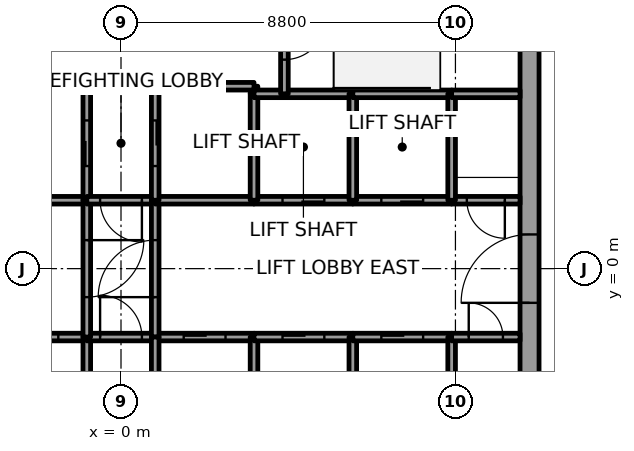
"""IFC4 building model, lengths in metres.
Left out: names, types, materials, properties, quantities, classifications, styles, units other than length and angle.
Written with IfcOpenShell. Run it as: python <this file> out.ifc"""

import sys

from ifc_helpers import new_model, si_unit, direction, frame, frame_2d, origin, place, context, subcontext, project, spatial, rectangle, extrude, element, fill, save


model = new_model("IFC4")
c1 = context("Model", 3, precision=1e-05, world=origin(), true_north=direction((0.0, 1.0)))
c2 = subcontext(c1, "Body", "Model", "MODEL_VIEW")
j1 = project(units=[si_unit("LENGTHUNIT", "METRE"), si_unit("PLANEANGLEUNIT", "RADIAN")], contexts=[c1])
p1 = place(None, origin())
s1 = spatial("IfcSite", under=j1, at=p1, CompositionType="ELEMENT")
p2 = place(p1, origin())
s2 = spatial("IfcBuilding", under=s1, at=p2, CompositionType="ELEMENT")
p3 = place(p2, frame((0.0, 0.0, 118.6)))
s3 = spatial("IfcBuildingStorey", under=s2, at=p3, CompositionType="ELEMENT", Elevation=118.6)
p4 = place(p3, frame((10.75, -7.5, 0.0), z_axis=(0.0, 0.0, 1.0), x_axis=(0.0, 1.0, 0.0)))
e1 = element("IfcWall", 1, at=p4, inside=s3, PredefinedType="SHEAR", context=c2, shape_type="SweptSolid", body=[
    extrude(rectangle(XDim=15.0, YDim=0.5, at=frame_2d((7.5, 0.0))), origin(), (0.0, 0.0, 1.0), 7.2),
])
p5 = place(p4, frame((6.6, 0.0, 0.0)))
e2 = element("IfcOpeningElement", 2, at=p5, cuts=e1, PredefinedType="OPENING", context=c2, shape_type="SweptSolid", body=[
    extrude(rectangle(XDim=1.8, YDim=2.1, at=frame_2d((0.9, 1.05))), frame((0.0, 0.25, 0.0), z_axis=(0.0, -1.0, 0.0), x_axis=(1.0, 0.0, 0.0)), (0.0, 0.0, 1.0), 0.5),
])
p6 = place(p3, frame((-3.5, -1.8, 0.0), z_axis=(0.0, 0.0, 1.0), x_axis=(1.0, 0.0, 0.0)))
e3 = element("IfcWall", 3, at=p6, inside=s3, PredefinedType="SOLIDWALL", context=c2, shape_type="SweptSolid", body=[
    extrude(rectangle(XDim=2.6, YDim=0.2, at=frame_2d((1.3, 0.0))), origin(), (0.0, 0.0, 1.0), 7.05),
])
p7 = place(p6, frame((0.75, 0.0, 0.0)))
e4 = element("IfcOpeningElement", 4, at=p7, cuts=e3, PredefinedType="OPENING", context=c2, shape_type="SweptSolid", body=[
    extrude(rectangle(XDim=1.1, YDim=2.1, at=frame_2d((0.55, 1.05))), frame((0.0, 0.1, 0.0), z_axis=(0.0, -1.0, 0.0), x_axis=(1.0, 0.0, 0.0)), (0.0, 0.0, 1.0), 0.2),
])
p8 = place(p3, frame((-0.9, 1.8, 0.0), z_axis=(0.0, 0.0, 1.0), x_axis=(-1.0, 0.0, 0.0)))
e5 = element("IfcWall", 5, at=p8, inside=s3, PredefinedType="SOLIDWALL", context=c2, shape_type="SweptSolid", body=[
    extrude(rectangle(XDim=2.6, YDim=0.2, at=frame_2d((1.3, 0.0))), origin(), (0.0, 0.0, 1.0), 7.05),
])
p9 = place(p3, frame((-0.9, 1.8, 0.0), z_axis=(0.0, 0.0, 1.0), x_axis=(0.0, 1.0, 0.0)))
e6 = element("IfcWall", 6, at=p9, inside=s3, PredefinedType="SOLIDWALL", context=c2, shape_type="SweptSolid", body=[
    extrude(rectangle(XDim=3.0, YDim=0.2, at=frame_2d((1.5, 0.0))), origin(), (0.0, 0.0, 1.0), 7.05),
])
p10 = place(p9, frame((0.9, 0.0, 0.0)))
e7 = element("IfcOpeningElement", 7, at=p10, cuts=e6, PredefinedType="OPENING", context=c2, shape_type="SweptSolid", body=[
    extrude(rectangle(XDim=1.2, YDim=2.1, at=frame_2d((0.6, 1.05))), frame((0.0, 0.1, 0.0), z_axis=(0.0, -1.0, 0.0), x_axis=(1.0, 0.0, 0.0)), (0.0, 0.0, 1.0), 0.2),
])
p11 = place(p3, frame((-0.9, 4.8, 0.0), z_axis=(0.0, 0.0, 1.0), x_axis=(-1.0, 0.0, 0.0)))
e8 = element("IfcWall", 8, at=p11, inside=s3, PredefinedType="SOLIDWALL", context=c2, shape_type="SweptSolid", body=[
    extrude(rectangle(XDim=2.6, YDim=0.2, at=frame_2d((1.3, 0.0))), origin(), (0.0, 0.0, 1.0), 7.05),
])
p12 = place(p3, frame((-0.9, -4.6, 0.0), z_axis=(0.0, 0.0, 1.0), x_axis=(0.0, 1.0, 0.0)))
e9 = element("IfcWall", 9, at=p12, inside=s3, PredefinedType="SOLIDWALL", context=c2, shape_type="SweptSolid", body=[
    extrude(rectangle(XDim=2.8, YDim=0.2, at=frame_2d((1.4, 0.0))), origin(), (0.0, 0.0, 1.0), 7.05),
])
p13 = place(p3, frame((-0.9, -1.8, 0.0), z_axis=(0.0, 0.0, 1.0), x_axis=(1.0, 0.0, 0.0)))
e10 = element("IfcWall", 10, at=p13, inside=s3, PredefinedType="SOLIDWALL", context=c2, shape_type="SweptSolid", body=[
    extrude(rectangle(XDim=1.8, YDim=0.2, at=frame_2d((0.9, 0.0))), origin(), (0.0, 0.0, 1.0), 7.05),
])
p14 = place(p13, frame((0.35, 0.0, 0.0)))
e11 = element("IfcOpeningElement", 11, at=p14, cuts=e10, PredefinedType="OPENING", context=c2, shape_type="SweptSolid", body=[
    extrude(rectangle(XDim=1.1, YDim=2.1, at=frame_2d((0.55, 1.05))), frame((0.0, 0.1, 0.0), z_axis=(0.0, -1.0, 0.0), x_axis=(1.0, 0.0, 0.0)), (0.0, 0.0, 1.0), 0.2),
])
p15 = place(p3, frame((-0.9, 1.8, 0.0), z_axis=(0.0, 0.0, 1.0), x_axis=(0.0, -1.0, 0.0)))
e12 = element("IfcWall", 12, at=p15, inside=s3, PredefinedType="SOLIDWALL", context=c2, shape_type="SweptSolid", body=[
    extrude(rectangle(XDim=3.6, YDim=0.2, at=frame_2d((1.8, 0.0))), origin(), (0.0, 0.0, 1.0), 7.05),
])
p16 = place(p15, frame((1.05, 0.0, 0.0)))
e13 = element("IfcOpeningElement", 13, at=p16, cuts=e12, PredefinedType="OPENING", context=c2, shape_type="SweptSolid", body=[
    extrude(rectangle(XDim=1.5, YDim=2.1, at=frame_2d((0.75, 1.05))), frame((0.0, 0.1, 0.0), z_axis=(0.0, -1.0, 0.0), x_axis=(1.0, 0.0, 0.0)), (0.0, 0.0, 1.0), 0.2),
])
p17 = place(p3, frame((0.9, 1.8, 0.0), z_axis=(0.0, 0.0, 1.0), x_axis=(-1.0, 0.0, 0.0)))
e14 = element("IfcWall", 14, at=p17, inside=s3, PredefinedType="SOLIDWALL", context=c2, shape_type="SweptSolid", body=[
    extrude(rectangle(XDim=1.8, YDim=0.2, at=frame_2d((0.9, 0.0))), origin(), (0.0, 0.0, 1.0), 7.05),
])
p18 = place(p17, frame((0.35, 0.0, 0.0)))
e15 = element("IfcOpeningElement", 15, at=p18, cuts=e14, PredefinedType="OPENING", context=c2, shape_type="SweptSolid", body=[
    extrude(rectangle(XDim=1.1, YDim=2.1, at=frame_2d((0.55, 1.05))), frame((0.0, 0.1, 0.0), z_axis=(0.0, -1.0, 0.0), x_axis=(1.0, 0.0, 0.0)), (0.0, 0.0, 1.0), 0.2),
])
p19 = place(p3, frame((0.9, -1.8, 0.0), z_axis=(0.0, 0.0, 1.0), x_axis=(1.0, 0.0, 0.0)))
e16 = element("IfcWall", 16, at=p19, inside=s3, PredefinedType="SOLIDWALL", context=c2, shape_type="SweptSolid", body=[
    extrude(rectangle(XDim=2.6, YDim=0.2, at=frame_2d((1.3, 0.0))), origin(), (0.0, 0.0, 1.0), 7.05),
])
p20 = place(p19, frame((0.75, 0.0, 0.0)))
e17 = element("IfcOpeningElement", 17, at=p20, cuts=e16, PredefinedType="OPENING", context=c2, shape_type="SweptSolid", body=[
    extrude(rectangle(XDim=1.1, YDim=2.1, at=frame_2d((0.55, 1.05))), frame((0.0, 0.1, 0.0), z_axis=(0.0, -1.0, 0.0), x_axis=(1.0, 0.0, 0.0)), (0.0, 0.0, 1.0), 0.2),
])
p21 = place(p3, frame((0.9, -1.8, 0.0), z_axis=(0.0, 0.0, 1.0), x_axis=(0.0, 1.0, 0.0)))
e18 = element("IfcWall", 18, at=p21, inside=s3, PredefinedType="SOLIDWALL", context=c2, shape_type="SweptSolid", body=[
    extrude(rectangle(XDim=3.6, YDim=0.2, at=frame_2d((1.8, 0.0))), origin(), (0.0, 0.0, 1.0), 7.05),
])
p22 = place(p21, frame((1.05, 0.0, 0.0)))
e19 = element("IfcOpeningElement", 19, at=p22, cuts=e18, PredefinedType="OPENING", context=c2, shape_type="SweptSolid", body=[
    extrude(rectangle(XDim=1.5, YDim=2.1, at=frame_2d((0.75, 1.05))), frame((0.0, 0.1, 0.0), z_axis=(0.0, -1.0, 0.0), x_axis=(1.0, 0.0, 0.0)), (0.0, 0.0, 1.0), 0.2),
])
p23 = place(p3, frame((0.9, -1.8, 0.0), z_axis=(0.0, 0.0, 1.0), x_axis=(0.0, -1.0, 0.0)))
e20 = element("IfcWall", 20, at=p23, inside=s3, PredefinedType="SOLIDWALL", context=c2, shape_type="SweptSolid", body=[
    extrude(rectangle(XDim=2.8, YDim=0.2, at=frame_2d((1.4, 0.0))), origin(), (0.0, 0.0, 1.0), 7.05),
])
p24 = place(p3, frame((3.5, 1.8, 0.0), z_axis=(0.0, 0.0, 1.0), x_axis=(-1.0, 0.0, 0.0)))
e21 = element("IfcWall", 21, at=p24, inside=s3, PredefinedType="SOLIDWALL", context=c2, shape_type="SweptSolid", body=[
    extrude(rectangle(XDim=2.6, YDim=0.2, at=frame_2d((1.3, 0.0))), origin(), (0.0, 0.0, 1.0), 7.05),
])
p25 = place(p3, frame((3.5, 4.6, 0.0), z_axis=(0.0, 0.0, 1.0), x_axis=(0.0, 1.0, 0.0)))
e22 = element("IfcWall", 22, at=p25, inside=s3, PredefinedType="SOLIDWALL", context=c2, shape_type="SweptSolid", body=[
    extrude(rectangle(XDim=0.2, YDim=0.2, at=frame_2d((0.1, 0.0))), origin(), (0.0, 0.0, 1.0), 7.05),
])
p26 = place(p3, frame((3.5, 4.8, 0.0), z_axis=(0.0, 0.0, 1.0), x_axis=(-1.0, 0.0, 0.0)))
e23 = element("IfcWall", 23, at=p26, inside=s3, PredefinedType="SOLIDWALL", context=c2, shape_type="SweptSolid", body=[
    extrude(rectangle(XDim=2.6, YDim=0.2, at=frame_2d((1.3, 0.0))), origin(), (0.0, 0.0, 1.0), 7.05),
])
p27 = place(p3, frame((0.9, 4.8, 0.0), z_axis=(0.0, 0.0, 1.0), x_axis=(0.0, -1.0, 0.0)))
e24 = element("IfcWall", 24, at=p27, inside=s3, PredefinedType="SOLIDWALL", context=c2, shape_type="SweptSolid", body=[
    extrude(rectangle(XDim=3.0, YDim=0.2, at=frame_2d((1.5, 0.0))), origin(), (0.0, 0.0, 1.0), 7.05),
])
p28 = place(p27, frame((0.9, 0.0, 0.0)))
e25 = element("IfcOpeningElement", 25, at=p28, cuts=e24, PredefinedType="OPENING", context=c2, shape_type="SweptSolid", body=[
    extrude(rectangle(XDim=1.2, YDim=2.1, at=frame_2d((0.6, 1.05))), frame((0.0, 0.1, 0.0), z_axis=(0.0, -1.0, 0.0), x_axis=(1.0, 0.0, 0.0)), (0.0, 0.0, 1.0), 0.2),
])
p29 = place(p3, frame((3.5, -4.6, 0.0), z_axis=(0.0, 0.0, 1.0), x_axis=(0.0, 1.0, 0.0)))
e26 = element("IfcWall", 26, at=p29, inside=s3, PredefinedType="SOLIDWALL", context=c2, shape_type="SweptSolid", body=[
    extrude(rectangle(XDim=2.8, YDim=0.2, at=frame_2d((1.4, 0.0))), origin(), (0.0, 0.0, 1.0), 7.05),
])
p30 = place(p3, frame((3.5, -1.8, 0.0), z_axis=(0.0, 0.0, 1.0), x_axis=(1.0, 0.0, 0.0)))
e27 = element("IfcWall", 27, at=p30, inside=s3, PredefinedType="SOLIDWALL", context=c2, shape_type="SweptSolid", body=[
    extrude(rectangle(XDim=2.6, YDim=0.2, at=frame_2d((1.3, 0.0))), origin(), (0.0, 0.0, 1.0), 7.05),
])
p31 = place(p30, frame((0.75, 0.0, 0.0)))
e28 = element("IfcOpeningElement", 28, at=p31, cuts=e27, PredefinedType="OPENING", context=c2, shape_type="SweptSolid", body=[
    extrude(rectangle(XDim=1.1, YDim=2.1, at=frame_2d((0.55, 1.05))), frame((0.0, 0.1, 0.0), z_axis=(0.0, -1.0, 0.0), x_axis=(1.0, 0.0, 0.0)), (0.0, 0.0, 1.0), 0.2),
])
p32 = place(p3, frame((6.1, 1.8, 0.0), z_axis=(0.0, 0.0, 1.0), x_axis=(-1.0, 0.0, 0.0)))
e29 = element("IfcWall", 29, at=p32, inside=s3, PredefinedType="SOLIDWALL", context=c2, shape_type="SweptSolid", body=[
    extrude(rectangle(XDim=2.6, YDim=0.2, at=frame_2d((1.3, 0.0))), origin(), (0.0, 0.0, 1.0), 7.05),
])
p33 = place(p32, frame((0.75, 0.0, 0.0)))
e30 = element("IfcOpeningElement", 30, at=p33, cuts=e29, PredefinedType="OPENING", context=c2, shape_type="SweptSolid", body=[
    extrude(rectangle(XDim=1.1, YDim=2.1, at=frame_2d((0.55, 1.05))), frame((0.0, 0.1, 0.0), z_axis=(0.0, -1.0, 0.0), x_axis=(1.0, 0.0, 0.0)), (0.0, 0.0, 1.0), 0.2),
])
p34 = place(p3, frame((3.5, 1.8, 0.0), z_axis=(0.0, 0.0, 1.0), x_axis=(0.0, 1.0, 0.0)))
e31 = element("IfcWall", 31, at=p34, inside=s3, PredefinedType="SOLIDWALL", context=c2, shape_type="SweptSolid", body=[
    extrude(rectangle(XDim=2.8, YDim=0.2, at=frame_2d((1.4, 0.0))), origin(), (0.0, 0.0, 1.0), 7.05),
])
p35 = place(p3, frame((4.3, 4.6, 0.0), z_axis=(0.0, 0.0, 1.0), x_axis=(-1.0, 0.0, 0.0)))
e32 = element("IfcWall", 32, at=p35, inside=s3, PredefinedType="SOLIDWALL", context=c2, shape_type="SweptSolid", body=[
    extrude(rectangle(XDim=0.8, YDim=0.2, at=frame_2d((0.4, 0.0))), origin(), (0.0, 0.0, 1.0), 7.05),
])
p36 = place(p3, frame((6.1, 4.6, 0.0), z_axis=(0.0, 0.0, 1.0), x_axis=(-1.0, 0.0, 0.0)))
e33 = element("IfcWall", 33, at=p36, inside=s3, PredefinedType="SOLIDWALL", context=c2, shape_type="SweptSolid", body=[
    extrude(rectangle(XDim=1.8, YDim=0.2, at=frame_2d((0.9, 0.0))), origin(), (0.0, 0.0, 1.0), 7.05),
])
p37 = place(p3, frame((4.3, 7.5, 0.0), z_axis=(0.0, 0.0, 1.0), x_axis=(0.0, -1.0, 0.0)))
e34 = element("IfcWall", 34, at=p37, inside=s3, PredefinedType="SOLIDWALL", context=c2, shape_type="SweptSolid", body=[
    extrude(rectangle(XDim=2.9, YDim=0.2, at=frame_2d((1.45, 0.0))), origin(), (0.0, 0.0, 1.0), 7.05),
])
p38 = place(p37, frame((0.9, 0.0, 0.0)))
e35 = element("IfcOpeningElement", 35, at=p38, cuts=e34, PredefinedType="OPENING", context=c2, shape_type="SweptSolid", body=[
    extrude(rectangle(XDim=1.1, YDim=2.1, at=frame_2d((0.55, 1.05))), frame((0.0, 0.1, 0.0), z_axis=(0.0, -1.0, 0.0), x_axis=(1.0, 0.0, 0.0)), (0.0, 0.0, 1.0), 0.2),
])
p39 = place(p3, frame((6.1, -4.6, 0.0), z_axis=(0.0, 0.0, 1.0), x_axis=(0.0, 1.0, 0.0)))
e36 = element("IfcWall", 36, at=p39, inside=s3, PredefinedType="SOLIDWALL", context=c2, shape_type="SweptSolid", body=[
    extrude(rectangle(XDim=2.8, YDim=0.2, at=frame_2d((1.4, 0.0))), origin(), (0.0, 0.0, 1.0), 7.05),
])
p40 = place(p3, frame((6.1, -1.8, 0.0), z_axis=(0.0, 0.0, 1.0), x_axis=(1.0, 0.0, 0.0)))
e37 = element("IfcWall", 37, at=p40, inside=s3, PredefinedType="SOLIDWALL", context=c2, shape_type="SweptSolid", body=[
    extrude(rectangle(XDim=2.6, YDim=0.2, at=frame_2d((1.3, 0.0))), origin(), (0.0, 0.0, 1.0), 7.05),
])
p41 = place(p40, frame((0.75, 0.0, 0.0)))
e38 = element("IfcOpeningElement", 38, at=p41, cuts=e37, PredefinedType="OPENING", context=c2, shape_type="SweptSolid", body=[
    extrude(rectangle(XDim=1.1, YDim=2.1, at=frame_2d((0.55, 1.05))), frame((0.0, 0.1, 0.0), z_axis=(0.0, -1.0, 0.0), x_axis=(1.0, 0.0, 0.0)), (0.0, 0.0, 1.0), 0.2),
])
p42 = place(p3, frame((8.7, 1.8, 0.0), z_axis=(0.0, 0.0, 1.0), x_axis=(-1.0, 0.0, 0.0)))
e39 = element("IfcWall", 39, at=p42, inside=s3, PredefinedType="SOLIDWALL", context=c2, shape_type="SweptSolid", body=[
    extrude(rectangle(XDim=2.6, YDim=0.2, at=frame_2d((1.3, 0.0))), origin(), (0.0, 0.0, 1.0), 7.05),
])
p43 = place(p42, frame((0.75, 0.0, 0.0)))
e40 = element("IfcOpeningElement", 40, at=p43, cuts=e39, PredefinedType="OPENING", context=c2, shape_type="SweptSolid", body=[
    extrude(rectangle(XDim=1.1, YDim=2.1, at=frame_2d((0.55, 1.05))), frame((0.0, 0.1, 0.0), z_axis=(0.0, -1.0, 0.0), x_axis=(1.0, 0.0, 0.0)), (0.0, 0.0, 1.0), 0.2),
])
p44 = place(p3, frame((6.1, 1.8, 0.0), z_axis=(0.0, 0.0, 1.0), x_axis=(0.0, 1.0, 0.0)))
e41 = element("IfcWall", 41, at=p44, inside=s3, PredefinedType="SOLIDWALL", context=c2, shape_type="SweptSolid", body=[
    extrude(rectangle(XDim=2.8, YDim=0.2, at=frame_2d((1.4, 0.0))), origin(), (0.0, 0.0, 1.0), 7.05),
])
p45 = place(p3, frame((8.7, 4.6, 0.0), z_axis=(0.0, 0.0, 1.0), x_axis=(-1.0, 0.0, 0.0)))
e42 = element("IfcWall", 42, at=p45, inside=s3, PredefinedType="SOLIDWALL", context=c2, shape_type="SweptSolid", body=[
    extrude(rectangle(XDim=2.6, YDim=0.2, at=frame_2d((1.3, 0.0))), origin(), (0.0, 0.0, 1.0), 7.05),
])
p46 = place(p3, frame((8.7, -1.8, 0.0), z_axis=(0.0, 0.0, 1.0), x_axis=(0.0, -1.0, 0.0)))
e43 = element("IfcWall", 43, at=p46, inside=s3, PredefinedType="SOLIDWALL", context=c2, shape_type="SweptSolid", body=[
    extrude(rectangle(XDim=2.8, YDim=0.2, at=frame_2d((1.4, 0.0))), origin(), (0.0, 0.0, 1.0), 7.05),
])
p47 = place(p3, frame((8.7, -1.8, 0.0), z_axis=(0.0, 0.0, 1.0), x_axis=(1.0, 0.0, 0.0)))
e44 = element("IfcWall", 44, at=p47, inside=s3, PredefinedType="SOLIDWALL", context=c2, shape_type="SweptSolid", body=[
    extrude(rectangle(XDim=1.8, YDim=0.2, at=frame_2d((0.9, 0.0))), origin(), (0.0, 0.0, 1.0), 7.05),
])
p48 = place(p47, frame((0.45, 0.0, 0.0)))
e45 = element("IfcOpeningElement", 45, at=p48, cuts=e44, PredefinedType="OPENING", context=c2, shape_type="SweptSolid", body=[
    extrude(rectangle(XDim=0.9, YDim=2.1, at=frame_2d((0.45, 1.05))), frame((0.0, 0.1, 0.0), z_axis=(0.0, -1.0, 0.0), x_axis=(1.0, 0.0, 0.0)), (0.0, 0.0, 1.0), 0.2),
])
p49 = place(p3, frame((10.5, 1.8, 0.0), z_axis=(0.0, 0.0, 1.0), x_axis=(-1.0, 0.0, 0.0)))
e46 = element("IfcWall", 46, at=p49, inside=s3, PredefinedType="SOLIDWALL", context=c2, shape_type="SweptSolid", body=[
    extrude(rectangle(XDim=1.8, YDim=0.2, at=frame_2d((0.9, 0.0))), origin(), (0.0, 0.0, 1.0), 7.05),
])
p50 = place(p49, frame((0.4, 0.0, 0.0)))
e47 = element("IfcOpeningElement", 47, at=p50, cuts=e46, PredefinedType="OPENING", context=c2, shape_type="SweptSolid", body=[
    extrude(rectangle(XDim=1.0, YDim=2.1, at=frame_2d((0.5, 1.05))), frame((0.0, 0.1, 0.0), z_axis=(0.0, -1.0, 0.0), x_axis=(1.0, 0.0, 0.0)), (0.0, 0.0, 1.0), 0.2),
])
p51 = place(p3, frame((8.7, 4.6, 0.0), z_axis=(0.0, 0.0, 1.0), x_axis=(0.0, -1.0, 0.0)))
e48 = element("IfcWall", 48, at=p51, inside=s3, PredefinedType="SOLIDWALL", context=c2, shape_type="SweptSolid", body=[
    extrude(rectangle(XDim=2.8, YDim=0.2, at=frame_2d((1.4, 0.0))), origin(), (0.0, 0.0, 1.0), 7.05),
])
p52 = place(p3, frame((10.5, 4.6, 0.0), z_axis=(0.0, 0.0, 1.0), x_axis=(-1.0, 0.0, 0.0)))
e49 = element("IfcWall", 49, at=p52, inside=s3, PredefinedType="SOLIDWALL", context=c2, shape_type="SweptSolid", body=[
    extrude(rectangle(XDim=1.8, YDim=0.2, at=frame_2d((0.9, 0.0))), origin(), (0.0, 0.0, 1.0), 7.05),
])
p53 = place(p7, origin())
e50 = element("IfcDoor", 50, at=p53, inside=s3, OperationType="SLIDING_TO_LEFT", PredefinedType="DOOR", context=c2, shape_type="SweptSolid", body=[
    extrude(rectangle(XDim=1.1, YDim=2.1, at=frame_2d((0.55, 1.05))), frame((0.0, 0.025, 0.0), z_axis=(0.0, -1.0, 0.0), x_axis=(1.0, 0.0, 0.0)), (0.0, 0.0, 1.0), 0.05),
])
fill(e4, e50)
p54 = place(p20, origin())
e51 = element("IfcDoor", 51, at=p54, inside=s3, OperationType="SLIDING_TO_LEFT", PredefinedType="DOOR", context=c2, shape_type="SweptSolid", body=[
    extrude(rectangle(XDim=1.1, YDim=2.1, at=frame_2d((0.55, 1.05))), frame((0.0, 0.025, 0.0), z_axis=(0.0, -1.0, 0.0), x_axis=(1.0, 0.0, 0.0)), (0.0, 0.0, 1.0), 0.05),
])
fill(e17, e51)
p55 = place(p31, origin())
e52 = element("IfcDoor", 52, at=p55, inside=s3, OperationType="SLIDING_TO_RIGHT", PredefinedType="DOOR", context=c2, shape_type="SweptSolid", body=[
    extrude(rectangle(XDim=1.1, YDim=2.1, at=frame_2d((0.55, 1.05))), frame((0.0, 0.025, 0.0), z_axis=(0.0, -1.0, 0.0), x_axis=(1.0, 0.0, 0.0)), (0.0, 0.0, 1.0), 0.05),
])
fill(e28, e52)
p56 = place(p41, origin())
e53 = element("IfcDoor", 53, at=p56, inside=s3, OperationType="SLIDING_TO_RIGHT", PredefinedType="DOOR", context=c2, shape_type="SweptSolid", body=[
    extrude(rectangle(XDim=1.1, YDim=2.1, at=frame_2d((0.55, 1.05))), frame((0.0, 0.025, 0.0), z_axis=(0.0, -1.0, 0.0), x_axis=(1.0, 0.0, 0.0)), (0.0, 0.0, 1.0), 0.05),
])
fill(e38, e53)
p57 = place(p33, origin())
e54 = element("IfcDoor", 54, at=p57, inside=s3, OperationType="SLIDING_TO_RIGHT", PredefinedType="DOOR", context=c2, shape_type="SweptSolid", body=[
    extrude(rectangle(XDim=1.1, YDim=2.1, at=frame_2d((0.55, 1.05))), frame((0.0, 0.025, 0.0), z_axis=(0.0, -1.0, 0.0), x_axis=(1.0, 0.0, 0.0)), (0.0, 0.0, 1.0), 0.05),
])
fill(e30, e54)
p58 = place(p43, origin())
e55 = element("IfcDoor", 55, at=p58, inside=s3, OperationType="SLIDING_TO_RIGHT", PredefinedType="DOOR", context=c2, shape_type="SweptSolid", body=[
    extrude(rectangle(XDim=1.1, YDim=2.1, at=frame_2d((0.55, 1.05))), frame((0.0, 0.025, 0.0), z_axis=(0.0, -1.0, 0.0), x_axis=(1.0, 0.0, 0.0)), (0.0, 0.0, 1.0), 0.05),
])
fill(e40, e55)
p59 = place(p10, origin())
e56 = element("IfcDoor", 56, at=p59, inside=s3, OperationType="SLIDING_TO_RIGHT", PredefinedType="DOOR", context=c2, shape_type="SweptSolid", body=[
    extrude(rectangle(XDim=1.2, YDim=2.1, at=frame_2d((0.6, 1.05))), frame((0.0, 0.025, 0.0), z_axis=(0.0, -1.0, 0.0), x_axis=(1.0, 0.0, 0.0)), (0.0, 0.0, 1.0), 0.05),
])
fill(e7, e56)
p60 = place(p28, origin())
e57 = element("IfcDoor", 57, at=p60, inside=s3, OperationType="SLIDING_TO_LEFT", PredefinedType="DOOR", context=c2, shape_type="SweptSolid", body=[
    extrude(rectangle(XDim=1.2, YDim=2.1, at=frame_2d((0.6, 1.05))), frame((0.0, 0.025, 0.0), z_axis=(0.0, -1.0, 0.0), x_axis=(1.0, 0.0, 0.0)), (0.0, 0.0, 1.0), 0.05),
])
fill(e25, e57)
p61 = place(p16, origin())
e58 = element("IfcDoor", 58, at=p61, inside=s3, OperationType="DOUBLE_DOOR_SINGLE_SWING", PredefinedType="DOOR", context=c2, shape_type="SweptSolid", body=[
    extrude(rectangle(XDim=1.5, YDim=2.1, at=frame_2d((0.75, 1.05))), frame((0.0, 0.025, 0.0), z_axis=(0.0, -1.0, 0.0), x_axis=(1.0, 0.0, 0.0)), (0.0, 0.0, 1.0), 0.05),
])
fill(e13, e58)
p62 = place(p22, origin())
e59 = element("IfcDoor", 59, at=p62, inside=s3, OperationType="DOUBLE_DOOR_SINGLE_SWING", PredefinedType="DOOR", context=c2, shape_type="SweptSolid", body=[
    extrude(rectangle(XDim=1.5, YDim=2.1, at=frame_2d((0.75, 1.05))), frame((0.0, 0.025, 0.0), z_axis=(0.0, -1.0, 0.0), x_axis=(1.0, 0.0, 0.0)), (0.0, 0.0, 1.0), 0.05),
])
fill(e19, e59)
p63 = place(p18, origin())
e60 = element("IfcDoor", 60, at=p63, inside=s3, OperationType="SINGLE_SWING_RIGHT", PredefinedType="DOOR", context=c2, shape_type="SweptSolid", body=[
    extrude(rectangle(XDim=1.1, YDim=2.1, at=frame_2d((0.55, 1.05))), frame((0.0, 0.025, 0.0), z_axis=(0.0, -1.0, 0.0), x_axis=(1.0, 0.0, 0.0)), (0.0, 0.0, 1.0), 0.05),
])
fill(e15, e60)
p64 = place(p14, origin())
e61 = element("IfcDoor", 61, at=p64, inside=s3, OperationType="SINGLE_SWING_LEFT", PredefinedType="DOOR", context=c2, shape_type="SweptSolid", body=[
    extrude(rectangle(XDim=1.1, YDim=2.1, at=frame_2d((0.55, 1.05))), frame((0.0, 0.025, 0.0), z_axis=(0.0, -1.0, 0.0), x_axis=(1.0, 0.0, 0.0)), (0.0, 0.0, 1.0), 0.05),
])
fill(e11, e61)
p65 = place(p50, origin())
e62 = element("IfcDoor", 62, at=p65, inside=s3, OperationType="SINGLE_SWING_LEFT", PredefinedType="DOOR", context=c2, shape_type="SweptSolid", body=[
    extrude(rectangle(XDim=1.0, YDim=2.1, at=frame_2d((0.5, 1.05))), frame((0.0, 0.025, 0.0), z_axis=(0.0, -1.0, 0.0), x_axis=(1.0, 0.0, 0.0)), (0.0, 0.0, 1.0), 0.05),
])
fill(e47, e62)
p66 = place(p38, origin())
e63 = element("IfcDoor", 63, at=p66, inside=s3, OperationType="SINGLE_SWING_RIGHT", PredefinedType="DOOR", context=c2, shape_type="SweptSolid", body=[
    extrude(rectangle(XDim=1.1, YDim=2.1, at=frame_2d((0.55, 1.05))), frame((0.0, 0.025, 0.0), z_axis=(0.0, -1.0, 0.0), x_axis=(1.0, 0.0, 0.0)), (0.0, 0.0, 1.0), 0.05),
])
fill(e35, e63)
p67 = place(p48, origin())
e64 = element("IfcDoor", 64, at=p67, inside=s3, OperationType="SINGLE_SWING_RIGHT", PredefinedType="DOOR", context=c2, shape_type="SweptSolid", body=[
    extrude(rectangle(XDim=0.9, YDim=2.1, at=frame_2d((0.45, 1.05))), frame((0.0, 0.025, 0.0), z_axis=(0.0, -1.0, 0.0), x_axis=(1.0, 0.0, 0.0)), (0.0, 0.0, 1.0), 0.05),
])
fill(e45, e64)
p68 = place(p5, origin())
e65 = element("IfcDoor", 65, at=p68, inside=s3, OperationType="DOUBLE_DOOR_SINGLE_SWING", PredefinedType="DOOR", context=c2, shape_type="SweptSolid", body=[
    extrude(rectangle(XDim=1.8, YDim=2.1, at=frame_2d((0.9, 1.05))), frame((0.0, 0.025, 0.0), z_axis=(0.0, -1.0, 0.0), x_axis=(1.0, 0.0, 0.0)), (0.0, 0.0, 1.0), 0.05),
])
fill(e2, e65)
save(model, sys.argv[1])
